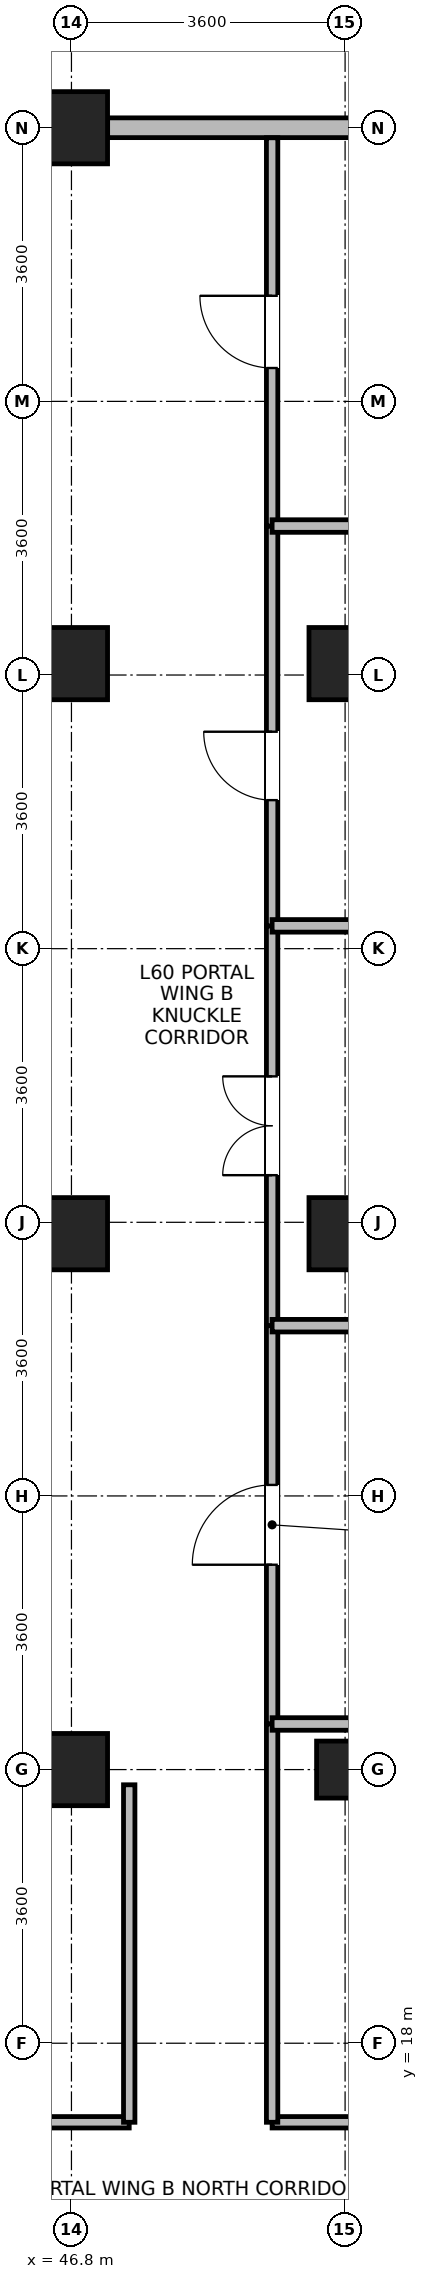
"""IFC4 building model, lengths in metres.
Left out: names, types, materials, properties, quantities, classifications, styles, units other than length and angle.
Written with IfcOpenShell. Run it as: python <this file> out.ifc"""

import sys

from ifc_helpers import new_model, si_unit, direction, frame, frame_2d, origin, origin_2d, place, context, subcontext, project, spatial, rectangle, extrude, source, transform, mapped, element, fill, save


model = new_model("IFC4")
c1 = context("Model", 3, precision=1e-05, world=origin(), true_north=direction((0.0, 1.0)))
c2 = subcontext(c1, "Body", "Model", "MODEL_VIEW")
j1 = project(units=[si_unit("LENGTHUNIT", "METRE"), si_unit("PLANEANGLEUNIT", "RADIAN")], contexts=[c1])
p1 = place(None, origin())
s1 = spatial("IfcSite", under=j1, at=p1, CompositionType="ELEMENT")
p2 = place(p1, origin())
s2 = spatial("IfcBuilding", under=s1, at=p2, CompositionType="ELEMENT")
p3 = place(p2, frame((0.0, 0.0, 235.1)))
s3 = spatial("IfcBuildingStorey", under=s2, at=p3, CompositionType="ELEMENT", Elevation=235.1)
m1 = source(origin(), c2, "Body", "SweptSolid", [
    extrude(rectangle(XDim=0.95, YDim=0.95, at=origin_2d()), origin(), (0.0, 0.0, 1.0), 3.7),
])
for number, where, z_axis, x_axis in (
    (1, (46.8, 21.6, 0.0), (0.0, 0.0, 1.0), (1.0, 0.0, 0.0)),
    (2, (46.8, 28.65, 0.0), (0.0, 0.0, 1.0), (1.0, 0.0, 0.0)),
    (3, (46.8, 36.15, 0.0), (0.0, 0.0, 1.0), (1.0, 0.0, 0.0)),
    (4, (46.8, 43.2, 0.0), (0.0, 0.0, 1.0), (1.0, 0.0, 0.0)),
):
    element("IfcColumn", number, at=place(p3, frame(where, z_axis=z_axis, x_axis=x_axis)), inside=s3, PredefinedType="COLUMN", context=c2, shape_type="MappedRepresentation", body=[
        mapped(m1, transform((0.0, 0.0, 0.0), x_axis=(1.0, 0.0, 0.0), y_axis=(0.0, 1.0, 0.0), z_axis=(0.0, 0.0, 1.0), scale=1.0)),
    ])
m2 = source(origin(), c2, "Body", "SweptSolid", [
    extrude(rectangle(XDim=0.75, YDim=0.75, at=origin_2d()), origin(), (0.0, 0.0, 1.0), 3.7),
])
p4 = place(p3, frame((50.4, 21.6, 0.0), z_axis=(0.0, 0.0, 1.0), x_axis=(1.0, 0.0, 0.0)))
e5 = element("IfcColumn", 5, at=p4, inside=s3, PredefinedType="PILASTER", context=c2, shape_type="MappedRepresentation", body=[
    mapped(m2, transform((0.0, 0.0, 0.0), x_axis=(1.0, 0.0, 0.0), y_axis=(0.0, 1.0, 0.0), z_axis=(0.0, 0.0, 1.0), scale=1.0)),
])
for number, where, z_axis, x_axis in (
    (6, (50.4, 28.65, 0.0), (0.0, 0.0, 1.0), (1.0, 0.0, 0.0)),
    (7, (50.4, 36.15, 0.0), (0.0, 0.0, 1.0), (1.0, 0.0, 0.0)),
):
    element("IfcColumn", number, at=place(p3, frame(where, z_axis=z_axis, x_axis=x_axis)), inside=s3, PredefinedType="COLUMN", context=c2, shape_type="MappedRepresentation", body=[
        mapped(m1, transform((0.0, 0.0, 0.0), x_axis=(1.0, 0.0, 0.0), y_axis=(0.0, 1.0, 0.0), z_axis=(0.0, 0.0, 1.0), scale=1.0)),
    ])
p5 = place(p3, frame((47.276, 43.2, 0.0), z_axis=(0.0, 0.0, 1.0), x_axis=(1.0, 0.0, 0.0)))
e8 = element("IfcWall", 8, at=p5, inside=s3, PredefinedType="STANDARD", context=c2, shape_type="SweptSolid", body=[
    extrude(rectangle(XDim=13.289, YDim=0.26, at=frame_2d((6.645, 0.0))), origin(), (0.0, 0.0, 1.0), 3.42),
])
p6 = place(p5, frame((4.383, 0.0, 0.85)))
e9 = element("IfcOpeningElement", 9, at=p6, cuts=e8, PredefinedType="OPENING", context=c2, shape_type="SweptSolid", body=[
    extrude(rectangle(XDim=1.2, YDim=1.75, at=frame_2d((0.6, 0.875))), frame((0.0, 0.14, 0.0), z_axis=(0.0, -1.0, 0.0), x_axis=(1.0, 0.0, 0.0)), (0.0, 0.0, 1.0), 0.28),
])
p7 = place(p5, frame((7.706, 0.0, 0.85)))
e10 = element("IfcOpeningElement", 10, at=p7, cuts=e8, PredefinedType="OPENING", context=c2, shape_type="SweptSolid", body=[
    extrude(rectangle(XDim=1.2, YDim=1.75, at=frame_2d((0.6, 0.875))), frame((0.0, 0.14, 0.0), z_axis=(0.0, -1.0, 0.0), x_axis=(1.0, 0.0, 0.0)), (0.0, 0.0, 1.0), 0.28),
])
p8 = place(p5, frame((11.028, 0.0, 0.85)))
e11 = element("IfcOpeningElement", 11, at=p8, cuts=e8, PredefinedType="OPENING", context=c2, shape_type="SweptSolid", body=[
    extrude(rectangle(XDim=1.2, YDim=1.75, at=frame_2d((0.6, 0.875))), frame((0.0, 0.14, 0.0), z_axis=(0.0, -1.0, 0.0), x_axis=(1.0, 0.0, 0.0)), (0.0, 0.0, 1.0), 0.28),
])
p9 = place(p3, frame((35.52, 16.96, 0.0), z_axis=(0.0, 0.0, 1.0), x_axis=(1.0, 0.0, 0.0)))
e12 = element("IfcWall", 12, at=p9, inside=s3, PredefinedType="PARTITIONING", context=c2, shape_type="SweptSolid", body=[
    extrude(rectangle(XDim=12.04, YDim=0.15, at=frame_2d((6.02, 0.0))), origin(), (0.0, 0.0, 1.0), 3.42),
])
p10 = place(p9, frame((5.37, 0.0, 0.0)))
e13 = element("IfcOpeningElement", 13, at=p10, cuts=e12, PredefinedType="OPENING", context=c2, shape_type="SweptSolid", body=[
    extrude(rectangle(XDim=1.3, YDim=2.12, at=frame_2d((0.65, 1.06))), frame((0.0, 0.085, 0.0), z_axis=(0.0, -1.0, 0.0), x_axis=(1.0, 0.0, 0.0)), (0.0, 0.0, 1.0), 0.17),
])
p11 = place(p3, frame((49.44, 16.96, 0.0), z_axis=(0.0, 0.0, 1.0), x_axis=(1.0, 0.0, 0.0)))
e14 = element("IfcWall", 14, at=p11, inside=s3, PredefinedType="PARTITIONING", context=c2, shape_type="SweptSolid", body=[
    extrude(rectangle(XDim=11.128, YDim=0.15, at=frame_2d((5.564, 0.0))), origin(), (0.0, 0.0, 1.0), 3.42),
])
p12 = place(p11, frame((5.089, 0.0, 0.0)))
e15 = element("IfcOpeningElement", 15, at=p12, cuts=e14, PredefinedType="OPENING", context=c2, shape_type="SweptSolid", body=[
    extrude(rectangle(XDim=0.95, YDim=2.1, at=frame_2d((0.475, 1.05))), frame((0.0, 0.085, 0.0), z_axis=(0.0, -1.0, 0.0), x_axis=(1.0, 0.0, 0.0)), (0.0, 0.0, 1.0), 0.17),
])
p13 = place(p3, frame((49.44, 27.44, 0.0), z_axis=(0.0, 0.0, 1.0), x_axis=(0.0, 1.0, 0.0)))
e16 = element("IfcWall", 16, at=p13, inside=s3, PredefinedType="PARTITIONING", context=c2, shape_type="SweptSolid", body=[
    extrude(rectangle(XDim=5.26, YDim=0.15, at=frame_2d((2.63, 0.0))), origin(), (0.0, 0.0, 1.0), 3.42),
])
p14 = place(p13, frame((1.98, 0.0, 0.0)))
e17 = element("IfcOpeningElement", 17, at=p14, cuts=e16, PredefinedType="OPENING", context=c2, shape_type="SweptSolid", body=[
    extrude(rectangle(XDim=1.3, YDim=2.12, at=frame_2d((0.65, 1.06))), frame((0.0, 0.085, 0.0), z_axis=(0.0, -1.0, 0.0), x_axis=(1.0, 0.0, 0.0)), (0.0, 0.0, 1.0), 0.17),
])
p15 = place(p3, frame((49.44, 32.7, 0.0), z_axis=(0.0, 0.0, 1.0), x_axis=(0.0, 1.0, 0.0)))
e18 = element("IfcWall", 18, at=p15, inside=s3, PredefinedType="PARTITIONING", context=c2, shape_type="SweptSolid", body=[
    extrude(rectangle(XDim=5.26, YDim=0.15, at=frame_2d((2.63, 0.0))), origin(), (0.0, 0.0, 1.0), 3.42),
])
p16 = place(p15, frame((1.654, 0.0, 0.0)))
e19 = element("IfcOpeningElement", 19, at=p16, cuts=e18, PredefinedType="OPENING", context=c2, shape_type="SweptSolid", body=[
    extrude(rectangle(XDim=0.9, YDim=2.08, at=frame_2d((0.45, 1.04))), frame((0.0, 0.085, 0.0), z_axis=(0.0, -1.0, 0.0), x_axis=(1.0, 0.0, 0.0)), (0.0, 0.0, 1.0), 0.17),
])
p17 = place(p3, frame((49.44, 22.2, 0.0), z_axis=(0.0, 0.0, 1.0), x_axis=(0.0, 1.0, 0.0)))
e20 = element("IfcWall", 20, at=p17, inside=s3, PredefinedType="PARTITIONING", context=c2, shape_type="SweptSolid", body=[
    extrude(rectangle(XDim=5.24, YDim=0.15, at=frame_2d((2.62, 0.0))), origin(), (0.0, 0.0, 1.0), 3.42),
])
p18 = place(p17, frame((2.095, 0.0, 0.0)))
e21 = element("IfcOpeningElement", 21, at=p18, cuts=e20, PredefinedType="OPENING", context=c2, shape_type="SweptSolid", body=[
    extrude(rectangle(XDim=1.05, YDim=2.12, at=frame_2d((0.525, 1.06))), frame((0.0, 0.085, 0.0), z_axis=(0.0, -1.0, 0.0), x_axis=(1.0, 0.0, 0.0)), (0.0, 0.0, 1.0), 0.17),
])
p19 = place(p3, frame((49.44, 37.96, 0.0), z_axis=(0.0, 0.0, 1.0), x_axis=(0.0, 1.0, 0.0)))
e22 = element("IfcWall", 22, at=p19, inside=s3, PredefinedType="PARTITIONING", context=c2, shape_type="SweptSolid", body=[
    extrude(rectangle(XDim=5.108, YDim=0.15, at=frame_2d((2.554, 0.0))), origin(), (0.0, 0.0, 1.0), 3.42),
])
p20 = place(p19, frame((2.079, 0.0, 0.0)))
e23 = element("IfcOpeningElement", 23, at=p20, cuts=e22, PredefinedType="OPENING", context=c2, shape_type="SweptSolid", body=[
    extrude(rectangle(XDim=0.95, YDim=2.1, at=frame_2d((0.475, 1.05))), frame((0.0, 0.085, 0.0), z_axis=(0.0, -1.0, 0.0), x_axis=(1.0, 0.0, 0.0)), (0.0, 0.0, 1.0), 0.17),
])
p21 = place(p3, frame((49.44, 16.96, 0.0), z_axis=(0.0, 0.0, 1.0), x_axis=(0.0, 1.0, 0.0)))
e24 = element("IfcWall", 24, at=p21, inside=s3, PredefinedType="PARTITIONING", context=c2, shape_type="SweptSolid", body=[
    extrude(rectangle(XDim=5.24, YDim=0.15, at=frame_2d((2.62, 0.0))), origin(), (0.0, 0.0, 1.0), 3.42),
])
p22 = place(p3, frame((47.56, 16.96, 0.0), z_axis=(0.0, 0.0, 1.0), x_axis=(0.0, 1.0, 0.0)))
e25 = element("IfcWall", 25, at=p22, inside=s3, PredefinedType="PARTITIONING", context=c2, shape_type="SweptSolid", body=[
    extrude(rectangle(XDim=4.44, YDim=0.15, at=frame_2d((2.22, 0.0))), origin(), (0.0, 0.0, 1.0), 3.42),
])
for number, where, z_axis, x_axis in (
    (26, (49.44, 22.2, 0.0), (0.0, 0.0, 1.0), (1.0, 0.0, 0.0)),
    (27, (49.44, 27.44, 0.0), (0.0, 0.0, 1.0), (1.0, 0.0, 0.0)),
    (28, (49.44, 32.7, 0.0), (0.0, 0.0, 1.0), (1.0, 0.0, 0.0)),
    (29, (49.44, 37.96, 0.0), (0.0, 0.0, 1.0), (1.0, 0.0, 0.0)),
):
    element("IfcWall", number, at=place(p3, frame(where, z_axis=z_axis, x_axis=x_axis)), inside=s3, PredefinedType="PARTITIONING", context=c2, shape_type="SweptSolid", body=[
        extrude(rectangle(XDim=11.128, YDim=0.165, at=frame_2d((5.564, 0.0))), origin(), (0.0, 0.0, 1.0), 3.42),
    ])
p23 = place(p14, origin())
e30 = element("IfcDoor", 30, at=p23, inside=s3, OperationType="DOUBLE_DOOR_SINGLE_SWING", PredefinedType="DOOR", context=c2, shape_type="SweptSolid", body=[
    extrude(rectangle(XDim=1.3, YDim=2.12, at=frame_2d((0.65, 1.06))), frame((0.0, 0.025, 0.0), z_axis=(0.0, -1.0, 0.0), x_axis=(1.0, 0.0, 0.0)), (0.0, 0.0, 1.0), 0.05),
])
fill(e17, e30)
p24 = place(p16, origin())
e31 = element("IfcDoor", 31, at=p24, inside=s3, OperationType="SINGLE_SWING_RIGHT", PredefinedType="DOOR", context=c2, shape_type="SweptSolid", body=[
    extrude(rectangle(XDim=0.9, YDim=2.08, at=frame_2d((0.45, 1.04))), frame((0.0, 0.025, 0.0), z_axis=(0.0, -1.0, 0.0), x_axis=(1.0, 0.0, 0.0)), (0.0, 0.0, 1.0), 0.05),
])
fill(e19, e31)
p25 = place(p18, origin())
e32 = element("IfcDoor", 32, at=p25, inside=s3, OperationType="SINGLE_SWING_LEFT", PredefinedType="DOOR", context=c2, shape_type="SweptSolid", body=[
    extrude(rectangle(XDim=1.05, YDim=2.12, at=frame_2d((0.525, 1.06))), frame((0.0, 0.025, 0.0), z_axis=(0.0, -1.0, 0.0), x_axis=(1.0, 0.0, 0.0)), (0.0, 0.0, 1.0), 0.05),
])
fill(e21, e32)
p26 = place(p20, origin())
e33 = element("IfcDoor", 33, at=p26, inside=s3, OperationType="SINGLE_SWING_RIGHT", PredefinedType="DOOR", context=c2, shape_type="SweptSolid", body=[
    extrude(rectangle(XDim=0.95, YDim=2.1, at=frame_2d((0.475, 1.05))), frame((0.0, 0.025, 0.0), z_axis=(0.0, -1.0, 0.0), x_axis=(1.0, 0.0, 0.0)), (0.0, 0.0, 1.0), 0.05),
])
fill(e23, e33)
save(model, sys.argv[1])
